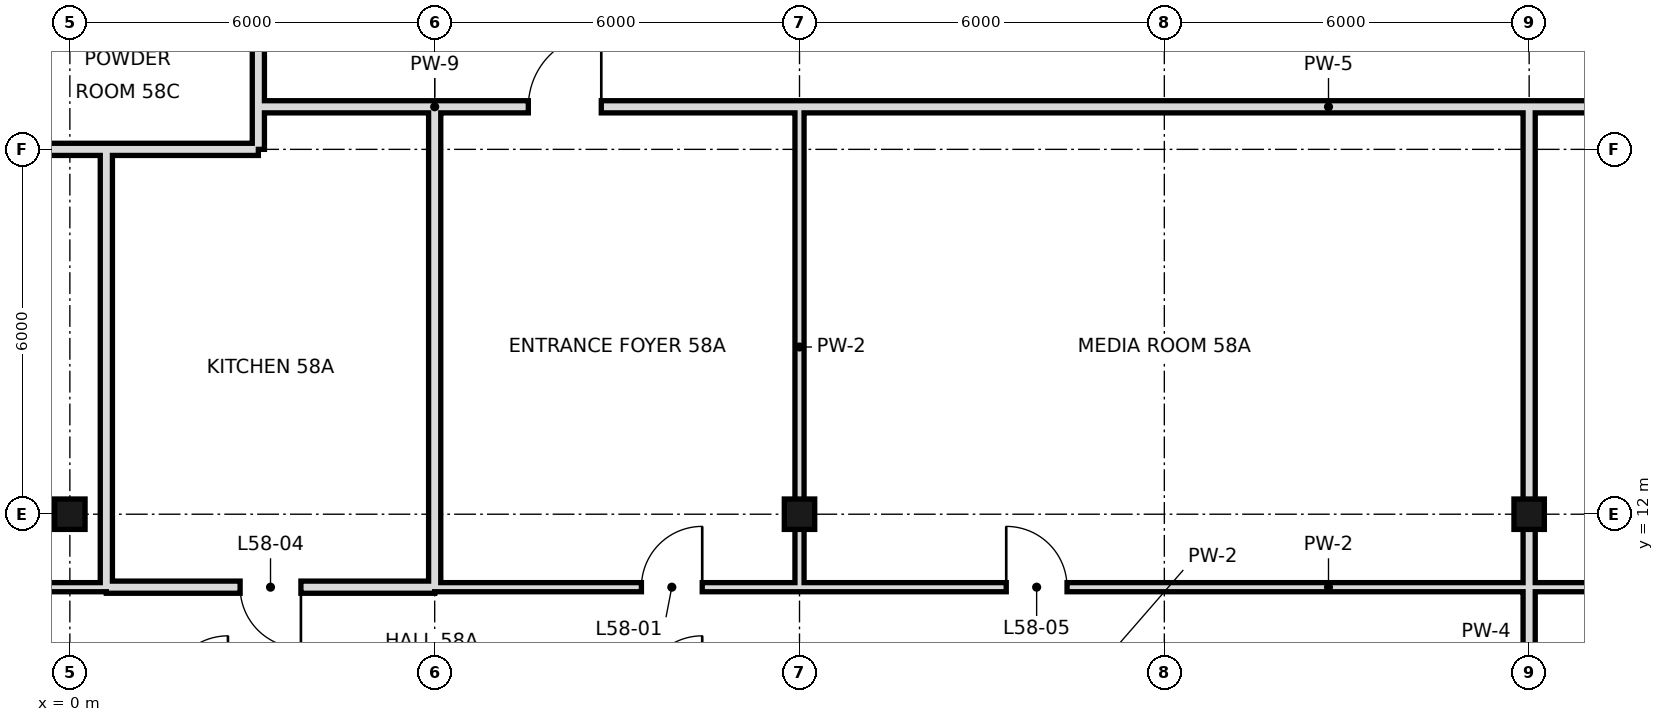
"""IFC4 building model, lengths in metres.
Left out: names, types, materials, properties, quantities, classifications, styles, units other than length and angle.
Written with IfcOpenShell. Run it as: python <this file> out.ifc"""

import sys

from ifc_helpers import new_model, si_unit, direction, frame, frame_2d, origin, origin_2d, place, context, subcontext, project, spatial, rectangle, hollow_rectangle, extrude, element, fill, save


model = new_model("IFC4")
c1 = context("Model", 3, precision=1e-05, world=origin(), true_north=direction((0.0, 1.0)))
c2 = subcontext(c1, "Body", "Model", "MODEL_VIEW")
j1 = project(units=[si_unit("LENGTHUNIT", "METRE"), si_unit("PLANEANGLEUNIT", "RADIAN")], contexts=[c1])
p1 = place(None, origin())
s1 = spatial("IfcSite", under=j1, at=p1, CompositionType="ELEMENT")
p2 = place(p1, origin())
s2 = spatial("IfcBuilding", under=s1, at=p2, CompositionType="ELEMENT")
p3 = place(p2, frame((0.0, 0.0, 246.8)))
s3 = spatial("IfcBuildingStorey", under=s2, at=p3, CompositionType="ELEMENT", Elevation=246.8)
for number, where, z_axis, x_axis in (
    (1, (0.0, 12.0, 0.0), (0.0, 0.0, 1.0), (1.0, 0.0, 0.0)),
    (2, (12.0, 12.0, 0.0), (0.0, 0.0, 1.0), (1.0, 0.0, 0.0)),
    (3, (24.0, 12.0, 0.0), (0.0, 0.0, 1.0), (1.0, 0.0, 0.0)),
):
    element("IfcColumn", number, at=place(p3, frame(where, z_axis=z_axis, x_axis=x_axis)), inside=s3, PredefinedType="COLUMN", context=c2, shape_type="SweptSolid", body=[
        extrude(hollow_rectangle(XDim=0.5, YDim=0.5, WallThickness=0.025, at=origin_2d()), origin(), (0.0, 0.0, 1.0), 3.6),
    ])
p4 = place(p3, frame((0.6, 10.8, 0.0), z_axis=(0.0, 0.0, 1.0), x_axis=(0.0, 1.0, 0.0)))
e4 = element("IfcWall", 4, at=p4, inside=s3, PredefinedType="SOLIDWALL", context=c2, shape_type="SweptSolid", body=[
    extrude(rectangle(XDim=7.2, YDim=0.2, at=frame_2d((3.6, 0.0))), origin(), (0.0, 0.0, 1.0), 2.72),
])
p5 = place(p3, frame((12.0, 10.8, 0.0), z_axis=(0.0, 0.0, 1.0), x_axis=(0.0, 1.0, 0.0)))
e5 = element("IfcWall", 5, at=p5, inside=s3, PredefinedType="PARTITIONING", context=c2, shape_type="SweptSolid", body=[
    extrude(rectangle(XDim=7.9, YDim=0.15, at=frame_2d((3.95, 0.0))), origin(), (0.0, 0.0, 1.0), 2.72),
])
p6 = place(p3, frame((24.0, 0.0, 0.0), z_axis=(0.0, 0.0, 1.0), x_axis=(0.0, 1.0, 0.0)))
e6 = element("IfcWall", 6, at=p6, inside=s3, PredefinedType="SOLIDWALL", context=c2, shape_type="SweptSolid", body=[
    extrude(rectangle(XDim=18.7, YDim=0.2, at=frame_2d((9.35, 0.0))), origin(), (0.0, 0.0, 1.0), 2.72),
])
p7 = place(p3, frame((3.1, 18.7, 0.0), z_axis=(0.0, 0.0, 1.0), x_axis=(0.0, 1.0, 0.0)))
e7 = element("IfcWall", 7, at=p7, inside=s3, PredefinedType="SOLIDWALL", context=c2, shape_type="SweptSolid", body=[
    extrude(rectangle(XDim=13.7, YDim=0.2, at=frame_2d((6.85, 0.0))), origin(), (0.0, 0.0, 1.0), 2.97),
])
p8 = place(p7, frame((11.3, 0.0, 0.0)))
e8 = element("IfcOpeningElement", 8, at=p8, cuts=e7, PredefinedType="OPENING", context=c2, shape_type="SweptSolid", body=[
    extrude(rectangle(XDim=1.2, YDim=2.4, at=frame_2d((0.6, 1.2))), frame((0.0, 0.11, 0.0), z_axis=(0.0, -1.0, 0.0), x_axis=(1.0, 0.0, 0.0)), (0.0, 0.0, 1.0), 0.22),
])
p9 = place(p3, frame((3.1, 18.0, 0.0), z_axis=(0.0, 0.0, 1.0), x_axis=(0.0, 1.0, 0.0)))
e9 = element("IfcWall", 9, at=p9, inside=s3, PredefinedType="SOLIDWALL", context=c2, shape_type="SweptSolid", body=[
    extrude(rectangle(XDim=0.7, YDim=0.2, at=frame_2d((0.35, 0.0))), origin(), (0.0, 0.0, 1.0), 2.97),
])
p10 = place(p3, frame((6.0, 10.8, 0.0), z_axis=(0.0, 0.0, 1.0), x_axis=(0.0, 1.0, 0.0)))
e10 = element("IfcWall", 10, at=p10, inside=s3, PredefinedType="SOLIDWALL", context=c2, shape_type="SweptSolid", body=[
    extrude(rectangle(XDim=7.9, YDim=0.2, at=frame_2d((3.95, 0.0))), origin(), (0.0, 0.0, 1.0), 2.72),
])
p11 = place(p3, frame((0.6, 10.8, 0.0), z_axis=(0.0, 0.0, 1.0), x_axis=(1.0, 0.0, 0.0)))
e11 = element("IfcWall", 11, at=p11, inside=s3, PredefinedType="SOLIDWALL", context=c2, shape_type="SweptSolid", body=[
    extrude(rectangle(XDim=5.4, YDim=0.2, at=frame_2d((2.7, 0.0))), origin(), (0.0, 0.0, 1.0), 2.72),
])
p12 = place(p11, frame((2.2, 0.0, 0.0)))
e12 = element("IfcOpeningElement", 12, at=p12, cuts=e11, PredefinedType="OPENING", context=c2, shape_type="SweptSolid", body=[
    extrude(rectangle(XDim=1.0, YDim=2.4, at=frame_2d((0.5, 1.2))), frame((0.0, 0.11, 0.0), z_axis=(0.0, -1.0, 0.0), x_axis=(1.0, 0.0, 0.0)), (0.0, 0.0, 1.0), 0.22),
])
p13 = place(p3, frame((-9.6, 10.8, 0.0), z_axis=(0.0, 0.0, 1.0), x_axis=(1.0, 0.0, 0.0)))
e13 = element("IfcWall", 13, at=p13, inside=s3, PredefinedType="PARTITIONING", context=c2, shape_type="SweptSolid", body=[
    extrude(rectangle(XDim=10.2, YDim=0.15, at=frame_2d((5.1, 0.0))), origin(), (0.0, 0.0, 1.0), 3.42),
])
p14 = place(p13, frame((6.34, 0.0, 0.0)))
e14 = element("IfcOpeningElement", 14, at=p14, cuts=e13, PredefinedType="OPENING", context=c2, shape_type="SweptSolid", body=[
    extrude(rectangle(XDim=1.0, YDim=2.4, at=frame_2d((0.5, 1.2))), frame((0.0, 0.085, 0.0), z_axis=(0.0, -1.0, 0.0), x_axis=(1.0, 0.0, 0.0)), (0.0, 0.0, 1.0), 0.17),
])
p15 = place(p3, frame((6.0, 10.8, 0.0), z_axis=(0.0, 0.0, 1.0), x_axis=(1.0, 0.0, 0.0)))
e15 = element("IfcWall", 15, at=p15, inside=s3, PredefinedType="PARTITIONING", context=c2, shape_type="SweptSolid", body=[
    extrude(rectangle(XDim=29.4, YDim=0.15, at=frame_2d((14.7, 0.0))), origin(), (0.0, 0.0, 1.0), 3.42),
])
p16 = place(p15, frame((3.4, 0.0, 0.0)))
e16 = element("IfcOpeningElement", 16, at=p16, cuts=e15, PredefinedType="OPENING", context=c2, shape_type="SweptSolid", body=[
    extrude(rectangle(XDim=1.0, YDim=2.4, at=frame_2d((0.5, 1.2))), frame((0.0, 0.085, 0.0), z_axis=(0.0, -1.0, 0.0), x_axis=(1.0, 0.0, 0.0)), (0.0, 0.0, 1.0), 0.17),
])
p17 = place(p15, frame((9.4, 0.0, 0.0)))
e17 = element("IfcOpeningElement", 17, at=p17, cuts=e15, PredefinedType="OPENING", context=c2, shape_type="SweptSolid", body=[
    extrude(rectangle(XDim=1.0, YDim=2.4, at=frame_2d((0.5, 1.2))), frame((0.0, 0.085, 0.0), z_axis=(0.0, -1.0, 0.0), x_axis=(1.0, 0.0, 0.0)), (0.0, 0.0, 1.0), 0.17),
])
p18 = place(p15, frame((19.3, 0.0, 0.0)))
e18 = element("IfcOpeningElement", 18, at=p18, cuts=e15, PredefinedType="OPENING", context=c2, shape_type="SweptSolid", body=[
    extrude(rectangle(XDim=1.0, YDim=2.4, at=frame_2d((0.5, 1.2))), frame((0.0, 0.085, 0.0), z_axis=(0.0, -1.0, 0.0), x_axis=(1.0, 0.0, 0.0)), (0.0, 0.0, 1.0), 0.17),
])
p19 = place(p15, frame((25.0, 0.0, 0.0)))
e19 = element("IfcOpeningElement", 19, at=p19, cuts=e15, PredefinedType="OPENING", context=c2, shape_type="SweptSolid", body=[
    extrude(rectangle(XDim=1.0, YDim=2.4, at=frame_2d((0.5, 1.2))), frame((0.0, 0.085, 0.0), z_axis=(0.0, -1.0, 0.0), x_axis=(1.0, 0.0, 0.0)), (0.0, 0.0, 1.0), 0.17),
])
p20 = place(p3, frame((0.6, 18.0, 0.0), z_axis=(0.0, 0.0, 1.0), x_axis=(1.0, 0.0, 0.0)))
e20 = element("IfcWall", 20, at=p20, inside=s3, PredefinedType="SOLIDWALL", context=c2, shape_type="SweptSolid", body=[
    extrude(rectangle(XDim=2.5, YDim=0.2, at=frame_2d((1.25, 0.0))), origin(), (0.0, 0.0, 1.0), 2.97),
])
p21 = place(p3, frame((-12.6, 18.0, 0.0), z_axis=(0.0, 0.0, 1.0), x_axis=(1.0, 0.0, 0.0)))
e21 = element("IfcWall", 21, at=p21, inside=s3, PredefinedType="SOLIDWALL", context=c2, shape_type="SweptSolid", body=[
    extrude(rectangle(XDim=13.2, YDim=0.2, at=frame_2d((6.6, 0.0))), origin(), (0.0, 0.0, 1.0), 2.72),
])
p22 = place(p3, frame((6.0, 18.7, 0.0), z_axis=(0.0, 0.0, 1.0), x_axis=(1.0, 0.0, 0.0)))
e22 = element("IfcWall", 22, at=p22, inside=s3, PredefinedType="SOLIDWALL", context=c2, shape_type="SweptSolid", body=[
    extrude(rectangle(XDim=29.4, YDim=0.2, at=frame_2d((14.7, 0.0))), origin(), (0.0, 0.0, 1.0), 2.72),
])
p23 = place(p22, frame((1.54, 0.0, 0.0)))
e23 = element("IfcOpeningElement", 23, at=p23, cuts=e22, PredefinedType="OPENING", context=c2, shape_type="SweptSolid", body=[
    extrude(rectangle(XDim=1.2, YDim=2.4, at=frame_2d((0.6, 1.2))), frame((0.0, 0.11, 0.0), z_axis=(0.0, -1.0, 0.0), x_axis=(1.0, 0.0, 0.0)), (0.0, 0.0, 1.0), 0.22),
])
p24 = place(p22, frame((19.58, 0.0, 0.0)))
e24 = element("IfcOpeningElement", 24, at=p24, cuts=e22, PredefinedType="OPENING", context=c2, shape_type="SweptSolid", body=[
    extrude(rectangle(XDim=1.2, YDim=2.4, at=frame_2d((0.6, 1.2))), frame((0.0, 0.11, 0.0), z_axis=(0.0, -1.0, 0.0), x_axis=(1.0, 0.0, 0.0)), (0.0, 0.0, 1.0), 0.22),
])
p25 = place(p3, frame((3.1, 18.7, 0.0), z_axis=(0.0, 0.0, 1.0), x_axis=(1.0, 0.0, 0.0)))
e25 = element("IfcWall", 25, at=p25, inside=s3, PredefinedType="SOLIDWALL", context=c2, shape_type="SweptSolid", body=[
    extrude(rectangle(XDim=2.9, YDim=0.2, at=frame_2d((1.45, 0.0))), origin(), (0.0, 0.0, 1.0), 2.72),
])
p26 = place(p16, frame((1.0, 0.0, 0.0), z_axis=(0.0, 0.0, 1.0), x_axis=(-1.0, 0.0, 0.0)))
e26 = element("IfcDoor", 26, at=p26, inside=s3, OperationType="SINGLE_SWING_LEFT", PredefinedType="DOOR", context=c2, shape_type="SweptSolid", body=[
    extrude(rectangle(XDim=1.0, YDim=2.4, at=frame_2d((0.5, 1.2))), frame((0.0, 0.025, 0.0), z_axis=(0.0, -1.0, 0.0), x_axis=(1.0, 0.0, 0.0)), (0.0, 0.0, 1.0), 0.05),
])
fill(e16, e26)
p27 = place(p12, origin())
e27 = element("IfcDoor", 27, at=p27, inside=s3, OperationType="SINGLE_SWING_RIGHT", PredefinedType="DOOR", context=c2, shape_type="SweptSolid", body=[
    extrude(rectangle(XDim=1.0, YDim=2.4, at=frame_2d((0.5, 1.2))), frame((0.0, 0.025, 0.0), z_axis=(0.0, -1.0, 0.0), x_axis=(1.0, 0.0, 0.0)), (0.0, 0.0, 1.0), 0.05),
])
fill(e12, e27)
p28 = place(p17, origin())
e28 = element("IfcDoor", 28, at=p28, inside=s3, OperationType="SINGLE_SWING_LEFT", PredefinedType="DOOR", context=c2, shape_type="SweptSolid", body=[
    extrude(rectangle(XDim=1.0, YDim=2.4, at=frame_2d((0.5, 1.2))), frame((0.0, 0.025, 0.0), z_axis=(0.0, -1.0, 0.0), x_axis=(1.0, 0.0, 0.0)), (0.0, 0.0, 1.0), 0.05),
])
fill(e17, e28)
p29 = place(p23, frame((1.2, 0.0, 0.0), z_axis=(0.0, 0.0, 1.0), x_axis=(-1.0, 0.0, 0.0)))
e29 = element("IfcDoor", 29, at=p29, inside=s3, OperationType="SINGLE_SWING_LEFT", PredefinedType="DOOR", context=c2, shape_type="SweptSolid", body=[
    extrude(rectangle(XDim=1.2, YDim=2.4, at=frame_2d((0.6, 1.2))), frame((0.0, 0.025, 0.0), z_axis=(0.0, -1.0, 0.0), x_axis=(1.0, 0.0, 0.0)), (0.0, 0.0, 1.0), 0.05),
])
fill(e23, e29)
save(model, sys.argv[1])
